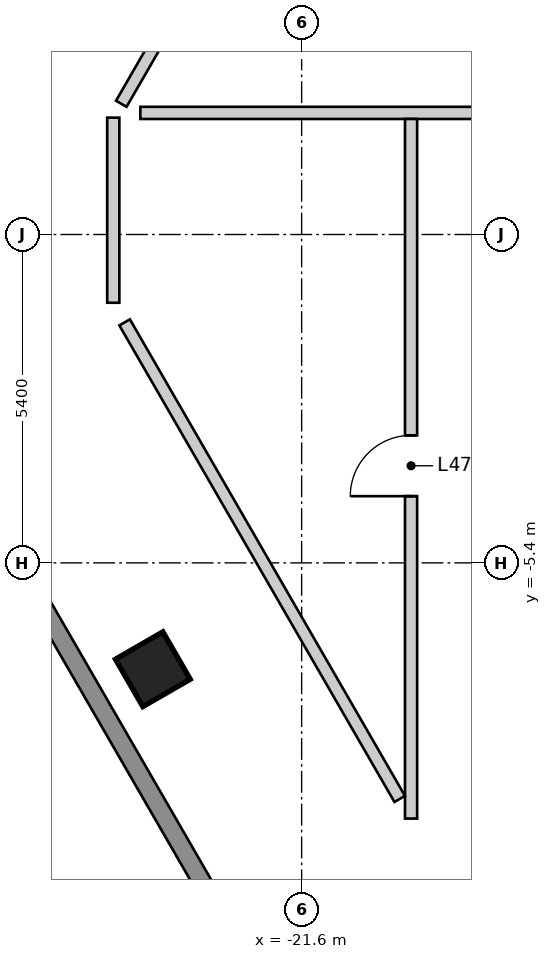
"""IFC4 building model, lengths in metres.
Left out: names, types, materials, properties, quantities, classifications, styles, units other than length and angle.
Written with IfcOpenShell. Run it as: python <this file> out.ifc"""

import sys

from ifc_helpers import new_model, si_unit, direction, frame, frame_2d, origin, origin_2d, place, context, subcontext, project, spatial, polyline, rectangle, outline, extrude, element, fill, save


model = new_model("IFC4")
c1 = context("Model", 3, precision=1e-05, world=origin(), true_north=direction((0.0, 1.0)))
c2 = subcontext(c1, "Body", "Model", "MODEL_VIEW")
j1 = project(units=[si_unit("LENGTHUNIT", "METRE"), si_unit("PLANEANGLEUNIT", "RADIAN")], contexts=[c1])
p1 = place(None, origin())
s1 = spatial("IfcSite", under=j1, at=p1, CompositionType="ELEMENT")
p2 = place(p1, origin())
s2 = spatial("IfcBuilding", under=s1, at=p2, CompositionType="ELEMENT")
p3 = place(p2, frame((0.0, 0.0, 153.6)))
s3 = spatial("IfcBuildingStorey", under=s2, at=p3, CompositionType="ELEMENT", Elevation=153.6)
p4 = place(p3, frame((-24.047, -7.149, 0.0), z_axis=(0.0, 0.0, 1.0), x_axis=(0.5, -0.866025403784, 0.0)))
e1 = element("IfcColumn", 1, at=p4, inside=s3, PredefinedType="COLUMN", context=c2, shape_type="SweptSolid", body=[
    extrude(rectangle(XDim=0.9, YDim=0.9, at=origin_2d()), origin(), (0.0, 0.0, 1.0), 3.6),
])
p5 = place(p3, frame((-16.555, 23.025, 0.0), z_axis=(0.0, 0.0, 1.0), x_axis=(-0.500020536353, -0.866013546791, 0.0)))
e2 = element("IfcWall", 2, at=p5, inside=s3, PredefinedType="SOLIDWALL", context=c2, shape_type="SweptSolid", body=[
    extrude(outline(polyline([(0.0, -0.15), (23.325, -0.15), (23.245, 0.15), (0.08, 0.15), (0.0, -0.15)])), origin(), (0.0, 0.0, 1.0), 2.6),
])
p6 = place(p3, frame((-28.218, -2.025, 0.0), z_axis=(0.0, 0.0, 1.0), x_axis=(0.500017503135, -0.866015298109, 0.0)))
e3 = element("IfcWall", 3, at=p6, inside=s3, PredefinedType="SOLIDWALL", context=c2, shape_type="SweptSolid", body=[
    extrude(outline(polyline([(0.0, -0.15), (24.711, -0.15), (24.631, 0.15), (0.08, 0.15), (0.0, -0.15)])), origin(), (0.0, 0.0, 1.0), 2.6),
])
p7 = place(p3, frame((-24.253, 2.0, 0.0), z_axis=(0.0, 0.0, 1.0), x_axis=(1.0, 0.0, 0.0)))
e4 = element("IfcWall", 4, at=p7, inside=s3, PredefinedType="SOLIDWALL", context=c2, shape_type="SweptSolid", body=[
    extrude(rectangle(XDim=48.506, YDim=0.2, at=frame_2d((24.253, 0.0))), origin(), (0.0, 0.0, 1.0), 2.6),
])
p8 = place(p7, frame((38.153, 0.0, 0.0)))
e5 = element("IfcOpeningElement", 5, at=p8, cuts=e4, PredefinedType="OPENING", context=c2, shape_type="SweptSolid", body=[
    extrude(rectangle(XDim=1.0, YDim=2.1, at=frame_2d((0.5, 1.05))), frame((0.0, 0.11, 0.0), z_axis=(0.0, -1.0, 0.0), x_axis=(1.0, 0.0, 0.0)), (0.0, 0.0, 1.0), 0.22),
])
p9 = place(p7, frame((28.801, 0.0, 0.0)))
e6 = element("IfcOpeningElement", 6, at=p9, cuts=e4, PredefinedType="OPENING", context=c2, shape_type="SweptSolid", body=[
    extrude(rectangle(XDim=1.8, YDim=2.1, at=frame_2d((0.9, 1.05))), frame((0.0, 0.11, 0.0), z_axis=(0.0, -1.0, 0.0), x_axis=(1.0, 0.0, 0.0)), (0.0, 0.0, 1.0), 0.22),
])
p10 = place(p3, frame((-24.698, -1.122, 0.0), z_axis=(0.0, 0.0, 1.0), x_axis=(0.0, 1.0, 0.0)))
e7 = element("IfcWall", 7, at=p10, inside=s3, PredefinedType="SOLIDWALL", context=c2, shape_type="SweptSolid", body=[
    extrude(rectangle(XDim=3.044, YDim=0.2, at=frame_2d((1.522, 0.0))), origin(), (0.0, 0.0, 1.0), 2.6),
])
p11 = place(p3, frame((-19.8, -9.605, 0.0), z_axis=(0.0, 0.0, 1.0), x_axis=(0.0, 1.0, 0.0)))
e8 = element("IfcWall", 8, at=p11, inside=s3, PredefinedType="SOLIDWALL", context=c2, shape_type="SweptSolid", body=[
    extrude(rectangle(XDim=11.505, YDim=0.2, at=frame_2d((5.752, 0.0))), origin(), (0.0, 0.0, 1.0), 2.6),
])
p12 = place(p11, frame((5.302, 0.0, 0.0)))
e9 = element("IfcOpeningElement", 9, at=p12, cuts=e8, PredefinedType="OPENING", context=c2, shape_type="SweptSolid", body=[
    extrude(rectangle(XDim=1.0, YDim=2.1, at=frame_2d((0.5, 1.05))), frame((0.0, 0.11, 0.0), z_axis=(0.0, -1.0, 0.0), x_axis=(1.0, 0.0, 0.0)), (0.0, 0.0, 1.0), 0.22),
])
p13 = place(p3, frame((-24.511, -1.445, 0.0), z_axis=(0.0, 0.0, 1.0), x_axis=(0.499940434119, -0.866059791431, 0.0)))
e10 = element("IfcWall", 10, at=p13, inside=s3, PredefinedType="SOLIDWALL", context=c2, shape_type="SweptSolid", body=[
    extrude(rectangle(XDim=9.049, YDim=0.2, at=frame_2d((4.524, 0.0))), origin(), (0.0, 0.0, 1.0), 2.6),
])
p14 = place(p3, frame((-24.566, 2.15, 0.0), z_axis=(0.0, 0.0, 1.0), x_axis=(0.499985443393, 0.866033807882, 0.0)))
e11 = element("IfcWall", 11, at=p14, inside=s3, PredefinedType="SOLIDWALL", context=c2, shape_type="SweptSolid", body=[
    extrude(rectangle(XDim=20.732, YDim=0.2, at=frame_2d((10.366, 0.0))), origin(), (0.0, 0.0, 1.0), 2.6),
])
p15 = place(p12, origin())
e12 = element("IfcDoor", 12, at=p15, inside=s3, OperationType="SINGLE_SWING_LEFT", PredefinedType="DOOR", context=c2, shape_type="SweptSolid", body=[
    extrude(rectangle(XDim=1.0, YDim=2.1, at=frame_2d((0.5, 1.05))), frame((0.0, 0.025, 0.0), z_axis=(0.0, -1.0, 0.0), x_axis=(1.0, 0.0, 0.0)), (0.0, 0.0, 1.0), 0.05),
])
fill(e9, e12)
save(model, sys.argv[1])
